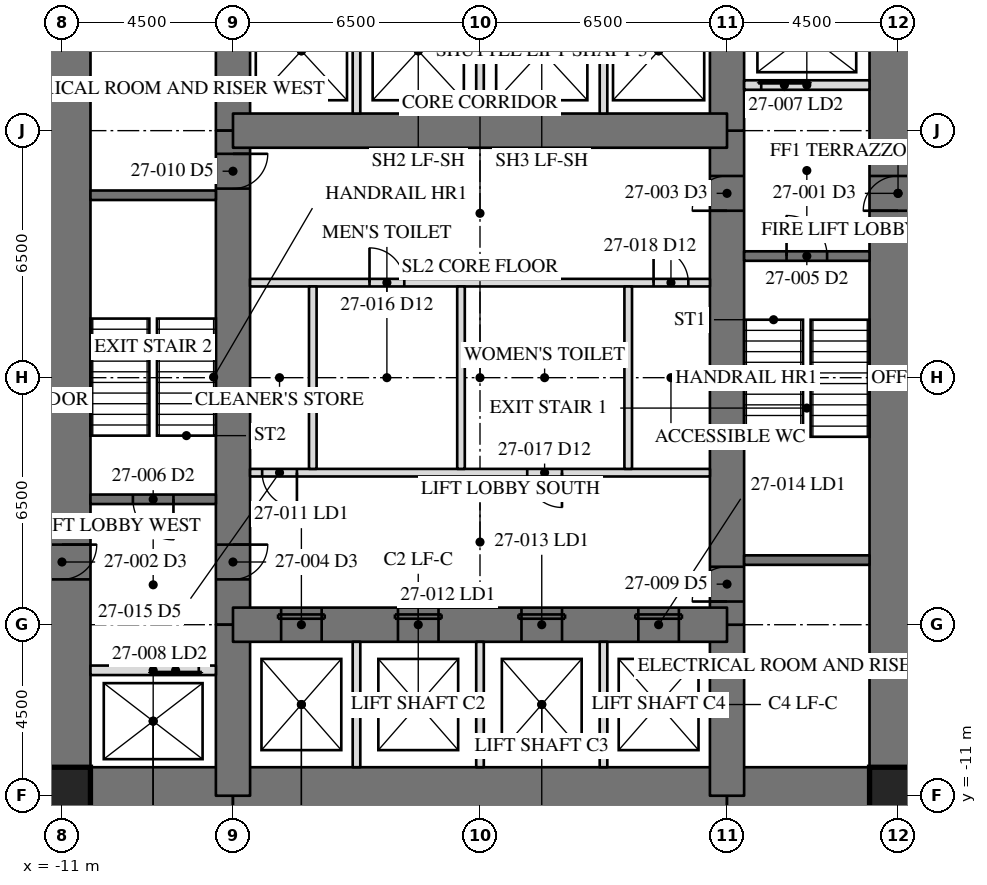
"""IFC4 building model, lengths in metres.
Left out: names, types, materials, properties, quantities, classifications, styles, units other than length and angle.
Written with IfcOpenShell. Run it as: python <this file> out.ifc"""

import sys

from ifc_helpers import new_model, si_unit, direction, frame, frame_2d, origin, origin_2d, place, context, subcontext, project, spatial, rectangle, hollow_rectangle, extrude, element, fill, save


model = new_model("IFC4")
c1 = context("Model", 3, precision=1e-05, world=origin(), true_north=direction((0.0, 1.0)))
c2 = subcontext(c1, "Body", "Model", "MODEL_VIEW")
j1 = project(units=[si_unit("LENGTHUNIT", "METRE"), si_unit("PLANEANGLEUNIT", "RADIAN")], contexts=[c1])
p1 = place(None, origin())
s1 = spatial("IfcSite", under=j1, at=p1, CompositionType="ELEMENT")
p2 = place(p1, origin())
s2 = spatial("IfcBuilding", under=s1, at=p2, CompositionType="ELEMENT")
p3 = place(p2, frame((0.0, 0.0, 117.2)))
s3 = spatial("IfcBuildingStorey", under=s2, at=p3, CompositionType="ELEMENT", Elevation=117.2)
p4 = place(p3, frame((11.0, -11.0, 0.0), z_axis=(0.0, 0.0, 1.0), x_axis=(0.0, 1.0, 0.0)))
e1 = element("IfcWall", 1, at=p4, inside=s3, PredefinedType="SHEAR", context=c2, shape_type="SweptSolid", body=[
    extrude(rectangle(XDim=22.0, YDim=1.5, at=frame_2d((11.0, 0.0))), origin(), (0.0, 0.0, 1.0), 4.1),
])
p5 = place(p4, frame((15.393, 0.0, 0.0)))
e2 = element("IfcOpeningElement", 2, at=p5, cuts=e1, PredefinedType="OPENING", context=c2, shape_type="SweptSolid", body=[
    extrude(rectangle(XDim=0.915, YDim=2.134, at=frame_2d((0.458, 1.067))), frame((0.0, 0.76, 0.0), z_axis=(0.0, -1.0, 0.0), x_axis=(1.0, 0.0, 0.0)), (0.0, 0.0, 1.0), 1.52),
])
p6 = place(p3, frame((-11.0, 11.0, 0.0), z_axis=(0.0, 0.0, 1.0), x_axis=(0.0, -1.0, 0.0)))
e3 = element("IfcWall", 3, at=p6, inside=s3, PredefinedType="SHEAR", context=c2, shape_type="SweptSolid", body=[
    extrude(rectangle(XDim=22.0, YDim=1.5, at=frame_2d((11.0, 0.0))), origin(), (0.0, 0.0, 1.0), 4.1),
])
p7 = place(p6, frame((15.393, 0.0, 0.0)))
e4 = element("IfcOpeningElement", 4, at=p7, cuts=e3, PredefinedType="OPENING", context=c2, shape_type="SweptSolid", body=[
    extrude(rectangle(XDim=0.915, YDim=2.134, at=frame_2d((0.458, 1.067))), frame((0.0, 0.76, 0.0), z_axis=(0.0, -1.0, 0.0), x_axis=(1.0, 0.0, 0.0)), (0.0, 0.0, 1.0), 1.52),
])
p8 = place(p3, frame((-11.0, -11.0, 0.0), z_axis=(0.0, 0.0, 1.0), x_axis=(1.0, 0.0, 0.0)))
e5 = element("IfcWall", 5, at=p8, inside=s3, PredefinedType="SHEAR", context=c2, shape_type="SweptSolid", body=[
    extrude(rectangle(XDim=4.5, YDim=1.5, at=frame_2d((2.25, 0.0))), origin(), (0.0, 0.0, 1.0), 4.1),
])
p9 = place(p3, frame((-6.5, -11.0, 0.0), z_axis=(0.0, 0.0, 1.0), x_axis=(1.0, 0.0, 0.0)))
e6 = element("IfcWall", 6, at=p9, inside=s3, PredefinedType="SHEAR", context=c2, shape_type="SweptSolid", body=[
    extrude(rectangle(XDim=13.0, YDim=1.5, at=frame_2d((6.5, 0.0))), origin(), (0.0, 0.0, 1.0), 4.1),
])
p10 = place(p3, frame((6.5, -11.0, 0.0), z_axis=(0.0, 0.0, 1.0), x_axis=(1.0, 0.0, 0.0)))
e7 = element("IfcWall", 7, at=p10, inside=s3, PredefinedType="SHEAR", context=c2, shape_type="SweptSolid", body=[
    extrude(rectangle(XDim=4.5, YDim=1.5, at=frame_2d((2.25, 0.0))), origin(), (0.0, 0.0, 1.0), 4.1),
])
p11 = place(p3, frame((6.5, -11.0, 0.0), z_axis=(0.0, 0.0, 1.0), x_axis=(0.0, 1.0, 0.0)))
e8 = element("IfcWall", 8, at=p11, inside=s3, PredefinedType="SHEAR", context=c2, shape_type="SweptSolid", body=[
    extrude(rectangle(XDim=4.5, YDim=0.9, at=frame_2d((2.25, 0.0))), origin(), (0.0, 0.0, 1.0), 4.1),
])
p12 = place(p3, frame((6.5, -6.5, 0.0), z_axis=(0.0, 0.0, 1.0), x_axis=(0.0, 1.0, 0.0)))
e9 = element("IfcWall", 9, at=p12, inside=s3, PredefinedType="SHEAR", context=c2, shape_type="SweptSolid", body=[
    extrude(rectangle(XDim=13.0, YDim=0.9, at=frame_2d((6.5, 0.0))), origin(), (0.0, 0.0, 1.0), 4.1),
])
p13 = place(p12, frame((10.893, 0.0, 0.0)))
e10 = element("IfcOpeningElement", 10, at=p13, cuts=e9, PredefinedType="OPENING", context=c2, shape_type="SweptSolid", body=[
    extrude(rectangle(XDim=0.915, YDim=2.134, at=frame_2d((0.458, 1.067))), frame((0.0, 0.46, 0.0), z_axis=(0.0, -1.0, 0.0), x_axis=(1.0, 0.0, 0.0)), (0.0, 0.0, 1.0), 0.92),
])
p14 = place(p12, frame((0.61, 0.0, 0.0)))
e11 = element("IfcOpeningElement", 11, at=p14, cuts=e9, PredefinedType="OPENING", context=c2, shape_type="SweptSolid", body=[
    extrude(rectangle(XDim=0.915, YDim=2.134, at=frame_2d((0.458, 1.067))), frame((0.0, 0.46, 0.0), z_axis=(0.0, -1.0, 0.0), x_axis=(1.0, 0.0, 0.0)), (0.0, 0.0, 1.0), 0.92),
])
for number, where, z_axis, x_axis in (
    (12, (6.5, 6.5, 0.0), (0.0, 0.0, 1.0), (0.0, 1.0, 0.0)),
    (13, (-6.5, 11.0, 0.0), (0.0, 0.0, 1.0), (0.0, -1.0, 0.0)),
):
    element("IfcWall", number, at=place(p3, frame(where, z_axis=z_axis, x_axis=x_axis)), inside=s3, PredefinedType="SHEAR", context=c2, shape_type="SweptSolid", body=[
        extrude(rectangle(XDim=4.5, YDim=0.9, at=frame_2d((2.25, 0.0))), origin(), (0.0, 0.0, 1.0), 4.1),
    ])
p15 = place(p3, frame((-6.5, 6.5, 0.0), z_axis=(0.0, 0.0, 1.0), x_axis=(0.0, -1.0, 0.0)))
e14 = element("IfcWall", 14, at=p15, inside=s3, PredefinedType="SHEAR", context=c2, shape_type="SweptSolid", body=[
    extrude(rectangle(XDim=13.0, YDim=0.9, at=frame_2d((6.5, 0.0))), origin(), (0.0, 0.0, 1.0), 4.1),
])
p16 = place(p15, frame((10.893, 0.0, 0.0)))
e15 = element("IfcOpeningElement", 15, at=p16, cuts=e14, PredefinedType="OPENING", context=c2, shape_type="SweptSolid", body=[
    extrude(rectangle(XDim=0.915, YDim=2.134, at=frame_2d((0.458, 1.067))), frame((0.0, 0.46, 0.0), z_axis=(0.0, -1.0, 0.0), x_axis=(1.0, 0.0, 0.0)), (0.0, 0.0, 1.0), 0.92),
])
p17 = place(p15, frame((0.61, 0.0, 0.0)))
e16 = element("IfcOpeningElement", 16, at=p17, cuts=e14, PredefinedType="OPENING", context=c2, shape_type="SweptSolid", body=[
    extrude(rectangle(XDim=0.915, YDim=2.134, at=frame_2d((0.458, 1.067))), frame((0.0, 0.46, 0.0), z_axis=(0.0, -1.0, 0.0), x_axis=(1.0, 0.0, 0.0)), (0.0, 0.0, 1.0), 0.92),
])
p18 = place(p3, frame((-6.5, -6.5, 0.0), z_axis=(0.0, 0.0, 1.0), x_axis=(0.0, -1.0, 0.0)))
e17 = element("IfcWall", 17, at=p18, inside=s3, PredefinedType="SHEAR", context=c2, shape_type="SweptSolid", body=[
    extrude(rectangle(XDim=4.5, YDim=0.9, at=frame_2d((2.25, 0.0))), origin(), (0.0, 0.0, 1.0), 4.1),
])
p19 = place(p3, frame((6.5, 6.5, 0.0), z_axis=(0.0, 0.0, 1.0), x_axis=(-1.0, 0.0, 0.0)))
e18 = element("IfcWall", 18, at=p19, inside=s3, PredefinedType="SHEAR", context=c2, shape_type="SweptSolid", body=[
    extrude(rectangle(XDim=13.0, YDim=0.9, at=frame_2d((6.5, 0.0))), origin(), (0.0, 0.0, 1.0), 4.1),
])
p20 = place(p3, frame((-6.5, -6.5, 0.0), z_axis=(0.0, 0.0, 1.0), x_axis=(1.0, 0.0, 0.0)))
e19 = element("IfcWall", 19, at=p20, inside=s3, PredefinedType="SHEAR", context=c2, shape_type="SweptSolid", body=[
    extrude(rectangle(XDim=13.0, YDim=0.9, at=frame_2d((6.5, 0.0))), origin(), (0.0, 0.0, 1.0), 4.1),
])
p21 = place(p20, frame((1.267, 0.0, 0.0)))
e20 = element("IfcOpeningElement", 20, at=p21, cuts=e19, PredefinedType="OPENING", context=c2, shape_type="SweptSolid", body=[
    extrude(rectangle(XDim=1.067, YDim=2.134, at=frame_2d((0.533, 1.067))), frame((0.0, 0.46, 0.0), z_axis=(0.0, -1.0, 0.0), x_axis=(1.0, 0.0, 0.0)), (0.0, 0.0, 1.0), 0.92),
])
p22 = place(p20, frame((4.342, 0.0, 0.0)))
e21 = element("IfcOpeningElement", 21, at=p22, cuts=e19, PredefinedType="OPENING", context=c2, shape_type="SweptSolid", body=[
    extrude(rectangle(XDim=1.067, YDim=2.134, at=frame_2d((0.533, 1.067))), frame((0.0, 0.46, 0.0), z_axis=(0.0, -1.0, 0.0), x_axis=(1.0, 0.0, 0.0)), (0.0, 0.0, 1.0), 0.92),
])
p23 = place(p20, frame((7.592, 0.0, 0.0)))
e22 = element("IfcOpeningElement", 22, at=p23, cuts=e19, PredefinedType="OPENING", context=c2, shape_type="SweptSolid", body=[
    extrude(rectangle(XDim=1.067, YDim=2.134, at=frame_2d((0.533, 1.067))), frame((0.0, 0.46, 0.0), z_axis=(0.0, -1.0, 0.0), x_axis=(1.0, 0.0, 0.0)), (0.0, 0.0, 1.0), 0.92),
])
p24 = place(p20, frame((10.667, 0.0, 0.0)))
e23 = element("IfcOpeningElement", 23, at=p24, cuts=e19, PredefinedType="OPENING", context=c2, shape_type="SweptSolid", body=[
    extrude(rectangle(XDim=1.067, YDim=2.134, at=frame_2d((0.533, 1.067))), frame((0.0, 0.46, 0.0), z_axis=(0.0, -1.0, 0.0), x_axis=(1.0, 0.0, 0.0)), (0.0, 0.0, 1.0), 0.92),
])
for number, where, z_axis, x_axis in (
    (24, (-11.0, -11.0, 0.0), (0.0, 0.0, 1.0), (1.0, 0.0, 0.0)),
    (25, (11.0, -11.0, 0.0), (0.0, 0.0, 1.0), (1.0, 0.0, 0.0)),
):
    element("IfcColumn", number, at=place(p3, frame(where, z_axis=z_axis, x_axis=x_axis)), inside=s3, PredefinedType="COLUMN", context=c2, shape_type="SweptSolid", body=[
        extrude(hollow_rectangle(XDim=1.499, YDim=1.499, WallThickness=0.102, at=origin_2d()), origin(), (0.0, 0.0, 1.0), 4.1),
    ])
for number, where, z_axis, x_axis in (
    (26, (6.95, -4.8, 0.0), (0.0, 0.0, 1.0), (1.0, 0.0, 0.0)),
    (27, (-6.95, 4.8, 0.0), (0.0, 0.0, 1.0), (-1.0, 0.0, 0.0)),
):
    element("IfcWall", number, at=place(p3, frame(where, z_axis=z_axis, x_axis=x_axis)), inside=s3, PredefinedType="SOLIDWALL", context=c2, shape_type="SweptSolid", body=[
        extrude(rectangle(XDim=3.3, YDim=0.25, at=frame_2d((1.65, 0.0))), origin(), (0.0, 0.0, 1.0), 3.91),
    ])
p25 = place(p3, frame((6.95, 3.2, 0.0), z_axis=(0.0, 0.0, 1.0), x_axis=(1.0, 0.0, 0.0)))
e28 = element("IfcWall", 28, at=p25, inside=s3, PredefinedType="SOLIDWALL", context=c2, shape_type="SweptSolid", body=[
    extrude(rectangle(XDim=3.3, YDim=0.25, at=frame_2d((1.65, 0.0))), origin(), (0.0, 0.0, 1.0), 3.91),
])
p26 = place(p25, frame((1.116, 0.0, 0.0)))
e29 = element("IfcOpeningElement", 29, at=p26, cuts=e28, PredefinedType="OPENING", context=c2, shape_type="SweptSolid", body=[
    extrude(rectangle(XDim=1.067, YDim=2.134, at=frame_2d((0.533, 1.067))), frame((0.0, 0.135, 0.0), z_axis=(0.0, -1.0, 0.0), x_axis=(1.0, 0.0, 0.0)), (0.0, 0.0, 1.0), 0.27),
])
p27 = place(p3, frame((-6.95, -3.2, 0.0), z_axis=(0.0, 0.0, 1.0), x_axis=(-1.0, 0.0, 0.0)))
e30 = element("IfcWall", 30, at=p27, inside=s3, PredefinedType="SOLIDWALL", context=c2, shape_type="SweptSolid", body=[
    extrude(rectangle(XDim=3.3, YDim=0.25, at=frame_2d((1.65, 0.0))), origin(), (0.0, 0.0, 1.0), 3.91),
])
p28 = place(p27, frame((1.116, 0.0, 0.0)))
e31 = element("IfcOpeningElement", 31, at=p28, cuts=e30, PredefinedType="OPENING", context=c2, shape_type="SweptSolid", body=[
    extrude(rectangle(XDim=1.067, YDim=2.134, at=frame_2d((0.533, 1.067))), frame((0.0, 0.135, 0.0), z_axis=(0.0, -1.0, 0.0), x_axis=(1.0, 0.0, 0.0)), (0.0, 0.0, 1.0), 0.27),
])
p29 = place(p3, frame((6.95, 7.7, 0.0), z_axis=(0.0, 0.0, 1.0), x_axis=(1.0, 0.0, 0.0)))
e32 = element("IfcWall", 32, at=p29, inside=s3, PredefinedType="PARTITIONING", context=c2, shape_type="SweptSolid", body=[
    extrude(rectangle(XDim=3.3, YDim=0.25, at=frame_2d((1.65, 0.0))), origin(), (0.0, 0.0, 1.0), 3.91),
])
p30 = place(p29, frame((0.45, 0.0, 0.0)))
e33 = element("IfcOpeningElement", 33, at=p30, cuts=e32, PredefinedType="OPENING", context=c2, shape_type="SweptSolid", body=[
    extrude(rectangle(XDim=1.219, YDim=2.134, at=frame_2d((0.609, 1.067))), frame((0.0, 0.135, 0.0), z_axis=(0.0, -1.0, 0.0), x_axis=(1.0, 0.0, 0.0)), (0.0, 0.0, 1.0), 0.27),
])
p31 = place(p3, frame((-6.95, -7.7, 0.0), z_axis=(0.0, 0.0, 1.0), x_axis=(-1.0, 0.0, 0.0)))
e34 = element("IfcWall", 34, at=p31, inside=s3, PredefinedType="PARTITIONING", context=c2, shape_type="SweptSolid", body=[
    extrude(rectangle(XDim=3.3, YDim=0.25, at=frame_2d((1.65, 0.0))), origin(), (0.0, 0.0, 1.0), 3.91),
])
p32 = place(p31, frame((0.45, 0.0, 0.0)))
e35 = element("IfcOpeningElement", 35, at=p32, cuts=e34, PredefinedType="OPENING", context=c2, shape_type="SweptSolid", body=[
    extrude(rectangle(XDim=1.219, YDim=2.134, at=frame_2d((0.609, 1.067))), frame((0.0, 0.135, 0.0), z_axis=(0.0, -1.0, 0.0), x_axis=(1.0, 0.0, 0.0)), (0.0, 0.0, 1.0), 0.27),
])
p33 = place(p3, frame((-6.05, 2.5, 0.0), z_axis=(0.0, 0.0, 1.0), x_axis=(1.0, 0.0, 0.0)))
e36 = element("IfcWall", 36, at=p33, inside=s3, PredefinedType="PARTITIONING", context=c2, shape_type="SweptSolid", body=[
    extrude(rectangle(XDim=12.1, YDim=0.2, at=frame_2d((6.05, 0.0))), origin(), (0.0, 0.0, 1.0), 3.91),
])
p34 = place(p33, frame((3.143, 0.0, 0.0)))
e37 = element("IfcOpeningElement", 37, at=p34, cuts=e36, PredefinedType="OPENING", context=c2, shape_type="SweptSolid", body=[
    extrude(rectangle(XDim=0.915, YDim=2.134, at=frame_2d((0.458, 1.067))), frame((0.0, 0.11, 0.0), z_axis=(0.0, -1.0, 0.0), x_axis=(1.0, 0.0, 0.0)), (0.0, 0.0, 1.0), 0.22),
])
p35 = place(p33, frame((10.617, 0.0, 0.0)))
e38 = element("IfcOpeningElement", 38, at=p35, cuts=e36, PredefinedType="OPENING", context=c2, shape_type="SweptSolid", body=[
    extrude(rectangle(XDim=0.915, YDim=2.134, at=frame_2d((0.458, 1.067))), frame((0.0, 0.11, 0.0), z_axis=(0.0, -1.0, 0.0), x_axis=(1.0, 0.0, 0.0)), (0.0, 0.0, 1.0), 0.22),
])
p36 = place(p3, frame((6.05, -2.5, 0.0), z_axis=(0.0, 0.0, 1.0), x_axis=(-1.0, 0.0, 0.0)))
e39 = element("IfcWall", 39, at=p36, inside=s3, PredefinedType="PARTITIONING", context=c2, shape_type="SweptSolid", body=[
    extrude(rectangle(XDim=12.1, YDim=0.2, at=frame_2d((6.05, 0.0))), origin(), (0.0, 0.0, 1.0), 3.91),
])
p37 = place(p36, frame((10.867, 0.0, 0.0)))
e40 = element("IfcOpeningElement", 40, at=p37, cuts=e39, PredefinedType="OPENING", context=c2, shape_type="SweptSolid", body=[
    extrude(rectangle(XDim=0.915, YDim=2.134, at=frame_2d((0.458, 1.067))), frame((0.0, 0.11, 0.0), z_axis=(0.0, -1.0, 0.0), x_axis=(1.0, 0.0, 0.0)), (0.0, 0.0, 1.0), 0.22),
])
p38 = place(p36, frame((3.893, 0.0, 0.0)))
e41 = element("IfcOpeningElement", 41, at=p38, cuts=e39, PredefinedType="OPENING", context=c2, shape_type="SweptSolid", body=[
    extrude(rectangle(XDim=0.915, YDim=2.134, at=frame_2d((0.458, 1.067))), frame((0.0, 0.11, 0.0), z_axis=(0.0, -1.0, 0.0), x_axis=(1.0, 0.0, 0.0)), (0.0, 0.0, 1.0), 0.22),
])
for number, where, z_axis, x_axis in (
    (42, (-3.25, 6.95, 0.0), (0.0, 0.0, 1.0), (0.0, 1.0, 0.0)),
    (43, (0.0, 6.95, 0.0), (0.0, 0.0, 1.0), (0.0, 1.0, 0.0)),
    (44, (3.25, 6.95, 0.0), (0.0, 0.0, 1.0), (0.0, 1.0, 0.0)),
    (45, (-3.25, -10.25, 0.0), (0.0, 0.0, 1.0), (0.0, 1.0, 0.0)),
    (46, (0.0, -10.25, 0.0), (0.0, 0.0, 1.0), (0.0, 1.0, 0.0)),
    (47, (3.25, -10.25, 0.0), (0.0, 0.0, 1.0), (0.0, 1.0, 0.0)),
):
    element("IfcWall", number, at=place(p3, frame(where, z_axis=z_axis, x_axis=x_axis)), inside=s3, PredefinedType="PARTITIONING", context=c2, shape_type="SweptSolid", body=[
        extrude(rectangle(XDim=3.3, YDim=0.2, at=frame_2d((1.65, 0.0))), origin(), (0.0, 0.0, 1.0), 3.91),
    ])
for number, where, z_axis, x_axis in (
    (48, (-4.4, -2.4, 0.0), (0.0, 0.0, 1.0), (0.0, 1.0, 0.0)),
    (49, (-0.5, -2.4, 0.0), (0.0, 0.0, 1.0), (0.0, 1.0, 0.0)),
    (50, (3.9, -2.4, 0.0), (0.0, 0.0, 1.0), (0.0, 1.0, 0.0)),
):
    element("IfcWall", number, at=place(p3, frame(where, z_axis=z_axis, x_axis=x_axis)), inside=s3, PredefinedType="PARTITIONING", context=c2, shape_type="SweptSolid", body=[
        extrude(rectangle(XDim=4.8, YDim=0.2, at=frame_2d((2.4, 0.0))), origin(), (0.0, 0.0, 1.0), 3.91),
    ])
p39 = place(p13, origin())
e51 = element("IfcDoor", 51, at=p39, inside=s3, OperationType="SINGLE_SWING_RIGHT", PredefinedType="DOOR", context=c2, shape_type="SweptSolid", body=[
    extrude(rectangle(XDim=0.915, YDim=2.134, at=frame_2d((0.458, 1.067))), frame((0.0, -0.375, 0.0), z_axis=(0.0, -1.0, 0.0), x_axis=(1.0, 0.0, 0.0)), (0.0, 0.0, 1.0), 0.05),
])
fill(e10, e51)
p40 = place(p16, origin())
e52 = element("IfcDoor", 52, at=p40, inside=s3, OperationType="SINGLE_SWING_RIGHT", PredefinedType="DOOR", context=c2, shape_type="SweptSolid", body=[
    extrude(rectangle(XDim=0.915, YDim=2.134, at=frame_2d((0.458, 1.067))), frame((0.0, -0.375, 0.0), z_axis=(0.0, -1.0, 0.0), x_axis=(1.0, 0.0, 0.0)), (0.0, 0.0, 1.0), 0.05),
])
fill(e15, e52)
p41 = place(p26, origin())
e53 = element("IfcDoor", 53, at=p41, inside=s3, OperationType="SINGLE_SWING_LEFT", PredefinedType="DOOR", context=c2, shape_type="SweptSolid", body=[
    extrude(rectangle(XDim=1.067, YDim=2.134, at=frame_2d((0.533, 1.067))), frame((0.0, 0.025, 0.0), z_axis=(0.0, -1.0, 0.0), x_axis=(1.0, 0.0, 0.0)), (0.0, 0.0, 1.0), 0.05),
])
fill(e29, e53)
p42 = place(p28, origin())
e54 = element("IfcDoor", 54, at=p42, inside=s3, OperationType="SINGLE_SWING_LEFT", PredefinedType="DOOR", context=c2, shape_type="SweptSolid", body=[
    extrude(rectangle(XDim=1.067, YDim=2.134, at=frame_2d((0.533, 1.067))), frame((0.0, 0.025, 0.0), z_axis=(0.0, -1.0, 0.0), x_axis=(1.0, 0.0, 0.0)), (0.0, 0.0, 1.0), 0.05),
])
fill(e31, e54)
p43 = place(p30, origin())
e55 = element("IfcDoor", 55, at=p43, inside=s3, OperationType="SLIDING_TO_LEFT", PredefinedType="DOOR", context=c2, shape_type="SweptSolid", body=[
    extrude(rectangle(XDim=1.219, YDim=2.134, at=frame_2d((0.609, 1.067))), frame((0.0, 0.025, 0.0), z_axis=(0.0, -1.0, 0.0), x_axis=(1.0, 0.0, 0.0)), (0.0, 0.0, 1.0), 0.05),
])
fill(e33, e55)
p44 = place(p32, origin())
e56 = element("IfcDoor", 56, at=p44, inside=s3, OperationType="SLIDING_TO_LEFT", PredefinedType="DOOR", context=c2, shape_type="SweptSolid", body=[
    extrude(rectangle(XDim=1.219, YDim=2.134, at=frame_2d((0.609, 1.067))), frame((0.0, 0.025, 0.0), z_axis=(0.0, -1.0, 0.0), x_axis=(1.0, 0.0, 0.0)), (0.0, 0.0, 1.0), 0.05),
])
fill(e35, e56)
p45 = place(p14, origin())
e57 = element("IfcDoor", 57, at=p45, inside=s3, OperationType="SINGLE_SWING_RIGHT", PredefinedType="DOOR", context=c2, shape_type="SweptSolid", body=[
    extrude(rectangle(XDim=0.915, YDim=2.134, at=frame_2d((0.458, 1.067))), frame((0.0, -0.375, 0.0), z_axis=(0.0, -1.0, 0.0), x_axis=(1.0, 0.0, 0.0)), (0.0, 0.0, 1.0), 0.05),
])
fill(e11, e57)
p46 = place(p17, origin())
e58 = element("IfcDoor", 58, at=p46, inside=s3, OperationType="SINGLE_SWING_RIGHT", PredefinedType="DOOR", context=c2, shape_type="SweptSolid", body=[
    extrude(rectangle(XDim=0.915, YDim=2.134, at=frame_2d((0.458, 1.067))), frame((0.0, -0.375, 0.0), z_axis=(0.0, -1.0, 0.0), x_axis=(1.0, 0.0, 0.0)), (0.0, 0.0, 1.0), 0.05),
])
fill(e16, e58)
p47 = place(p21, origin())
e59 = element("IfcDoor", 59, at=p47, inside=s3, OperationType="SLIDING_TO_LEFT", PredefinedType="DOOR", context=c2, shape_type="SweptSolid", body=[
    extrude(rectangle(XDim=1.067, YDim=2.134, at=frame_2d((0.533, 1.067))), frame((0.0, -0.375, 0.0), z_axis=(0.0, -1.0, 0.0), x_axis=(1.0, 0.0, 0.0)), (0.0, 0.0, 1.0), 0.05),
])
fill(e20, e59)
p48 = place(p22, origin())
e60 = element("IfcDoor", 60, at=p48, inside=s3, OperationType="SLIDING_TO_LEFT", PredefinedType="DOOR", context=c2, shape_type="SweptSolid", body=[
    extrude(rectangle(XDim=1.067, YDim=2.134, at=frame_2d((0.533, 1.067))), frame((0.0, -0.375, 0.0), z_axis=(0.0, -1.0, 0.0), x_axis=(1.0, 0.0, 0.0)), (0.0, 0.0, 1.0), 0.05),
])
fill(e21, e60)
p49 = place(p23, origin())
e61 = element("IfcDoor", 61, at=p49, inside=s3, OperationType="SLIDING_TO_LEFT", PredefinedType="DOOR", context=c2, shape_type="SweptSolid", body=[
    extrude(rectangle(XDim=1.067, YDim=2.134, at=frame_2d((0.533, 1.067))), frame((0.0, -0.375, 0.0), z_axis=(0.0, -1.0, 0.0), x_axis=(1.0, 0.0, 0.0)), (0.0, 0.0, 1.0), 0.05),
])
fill(e22, e61)
p50 = place(p24, origin())
e62 = element("IfcDoor", 62, at=p50, inside=s3, OperationType="SLIDING_TO_LEFT", PredefinedType="DOOR", context=c2, shape_type="SweptSolid", body=[
    extrude(rectangle(XDim=1.067, YDim=2.134, at=frame_2d((0.533, 1.067))), frame((0.0, -0.375, 0.0), z_axis=(0.0, -1.0, 0.0), x_axis=(1.0, 0.0, 0.0)), (0.0, 0.0, 1.0), 0.05),
])
fill(e23, e62)
p51 = place(p37, origin())
e63 = element("IfcDoor", 63, at=p51, inside=s3, OperationType="SINGLE_SWING_RIGHT", PredefinedType="DOOR", context=c2, shape_type="SweptSolid", body=[
    extrude(rectangle(XDim=0.915, YDim=2.134, at=frame_2d((0.458, 1.067))), frame((0.0, 0.025, 0.0), z_axis=(0.0, -1.0, 0.0), x_axis=(1.0, 0.0, 0.0)), (0.0, 0.0, 1.0), 0.05),
])
fill(e40, e63)
p52 = place(p34, origin())
e64 = element("IfcDoor", 64, at=p52, inside=s3, OperationType="SINGLE_SWING_LEFT", PredefinedType="DOOR", context=c2, shape_type="SweptSolid", body=[
    extrude(rectangle(XDim=0.915, YDim=2.134, at=frame_2d((0.458, 1.067))), frame((0.0, 0.025, 0.0), z_axis=(0.0, -1.0, 0.0), x_axis=(1.0, 0.0, 0.0)), (0.0, 0.0, 1.0), 0.05),
])
fill(e37, e64)
p53 = place(p38, origin())
e65 = element("IfcDoor", 65, at=p53, inside=s3, OperationType="SINGLE_SWING_LEFT", PredefinedType="DOOR", context=c2, shape_type="SweptSolid", body=[
    extrude(rectangle(XDim=0.915, YDim=2.134, at=frame_2d((0.458, 1.067))), frame((0.0, 0.025, 0.0), z_axis=(0.0, -1.0, 0.0), x_axis=(1.0, 0.0, 0.0)), (0.0, 0.0, 1.0), 0.05),
])
fill(e41, e65)
p54 = place(p35, origin())
e66 = element("IfcDoor", 66, at=p54, inside=s3, OperationType="SINGLE_SWING_LEFT", PredefinedType="DOOR", context=c2, shape_type="SweptSolid", body=[
    extrude(rectangle(XDim=0.915, YDim=2.134, at=frame_2d((0.458, 1.067))), frame((0.0, 0.025, 0.0), z_axis=(0.0, -1.0, 0.0), x_axis=(1.0, 0.0, 0.0)), (0.0, 0.0, 1.0), 0.05),
])
fill(e38, e66)
save(model, sys.argv[1])
